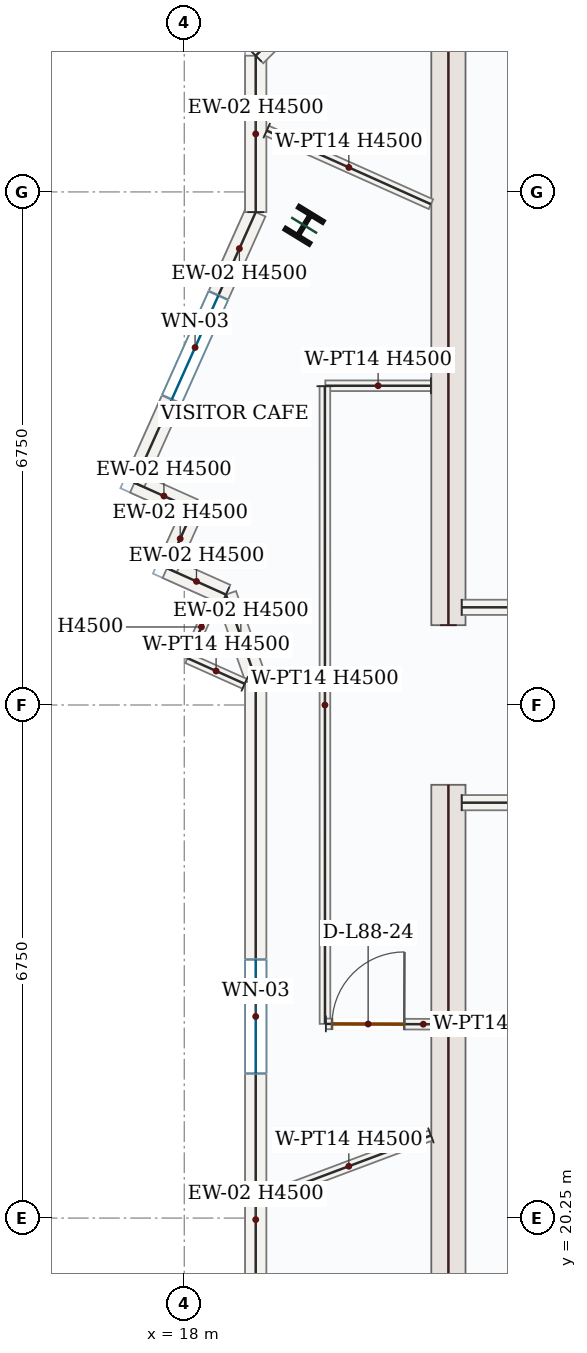
"""IFC4 building model, lengths in metres.
Left out: names, types, materials, properties, quantities, classifications, styles, units other than length and angle.
Written with IfcOpenShell. Run it as: python <this file> out.ifc"""

import sys

from ifc_helpers import new_model, si_unit, direction, frame, frame_2d, origin, origin_2d, place, context, subcontext, project, spatial, rectangle, i_section, extrude, source, transform, mapped, element, fill, save


model = new_model("IFC4")
c1 = context("Model", 3, precision=1e-05, world=origin(), true_north=direction((0.0, 1.0)))
c2 = subcontext(c1, "Body", "Model", "MODEL_VIEW")
j1 = project(units=[si_unit("LENGTHUNIT", "METRE"), si_unit("PLANEANGLEUNIT", "RADIAN")], contexts=[c1])
p1 = place(None, origin())
s1 = spatial("IfcSite", under=j1, at=p1, CompositionType="ELEMENT")
p2 = place(p1, origin())
s2 = spatial("IfcBuilding", under=s1, at=p2, CompositionType="ELEMENT")
p3 = place(p2, frame((0.0, 0.0, 361.05)))
s3 = spatial("IfcBuildingStorey", under=s2, at=p3, CompositionType="ELEMENT", Elevation=361.05)
m1 = source(origin(), c2, "Body", "SweptSolid", [
    extrude(rectangle(XDim=8.55, YDim=0.45, at=frame_2d((4.275, 0.0))), origin(), (0.0, 0.0, 1.0), 4.5),
])
for number, where, z_axis, x_axis in (
    (1, (21.475, 17.4, 0.0), (0.0, 0.0, 1.0), (0.0, 1.0, 0.0)),
    (2, (21.475, 28.05, 0.0), (0.0, 0.0, 1.0), (0.0, 1.0, 0.0)),
):
    element("IfcWall", number, at=place(p3, frame(where, z_axis=z_axis, x_axis=x_axis)), inside=s3, PredefinedType="SHEAR", context=c2, shape_type="MappedRepresentation", body=[
        mapped(m1, transform((0.0, 0.0, 0.0), x_axis=(1.0, 0.0, 0.0), y_axis=(0.0, 1.0, 0.0), z_axis=(0.0, 0.0, 1.0), scale=1.0)),
    ])
m2 = source(origin(), c2, "Body", "SweptSolid", [
    extrude(i_section(OverallWidth=0.369, OverallDepth=0.356, WebThickness=0.011, FlangeThickness=0.018, FilletRadius=0.018, at=origin_2d()), origin(), (0.0, 0.0, 1.0), 4.8),
])
p4 = place(p3, frame((19.577, 33.311, 0.0), z_axis=(0.0, 0.0, 1.0), x_axis=(-0.852640164354, 0.522498564716, 0.0)))
e3 = element("IfcColumn", 3, at=p4, inside=s3, PredefinedType="COLUMN", context=c2, shape_type="MappedRepresentation", body=[
    mapped(m2, transform((0.0, 0.0, 0.0), x_axis=(1.0, 0.0, 0.0), y_axis=(0.0, 1.0, 0.0), z_axis=(0.0, 0.0, 1.0), scale=1.0)),
])
p5 = place(p3, frame((18.94, 18.458, 0.0), z_axis=(0.0, 0.0, 1.0), x_axis=(0.0, 1.0, 0.0)))
e4 = element("IfcWall", 4, at=p5, inside=s3, PredefinedType="SOLIDWALL", context=c2, shape_type="SweptSolid", body=[
    extrude(rectangle(XDim=8.887, YDim=0.28, at=frame_2d((4.444, 0.0))), origin(), (0.0, 0.0, 1.0), 4.5),
])
p6 = place(p5, frame((3.694, 0.0, 0.85)))
e5 = element("IfcOpeningElement", 5, at=p6, cuts=e4, PredefinedType="OPENING", context=c2, shape_type="SweptSolid", body=[
    extrude(rectangle(XDim=1.5, YDim=1.5, at=frame_2d((0.75, 0.75))), frame((0.0, 0.15, 0.0), z_axis=(0.0, -1.0, 0.0), x_axis=(1.0, 0.0, 0.0)), (0.0, 0.0, 1.0), 0.3),
])
m3 = source(origin(), c2, "Body", "SweptSolid", [
    extrude(rectangle(XDim=1.174, YDim=0.28, at=frame_2d((0.587, 0.0))), origin(), (0.0, 0.0, 1.0), 4.5),
])
p7 = place(p3, frame((18.94, 27.345, 0.0), z_axis=(0.0, 0.0, 1.0), x_axis=(-0.333581493928, 0.942721266817, 0.0)))
e6 = element("IfcWall", 6, at=p7, inside=s3, PredefinedType="SOLIDWALL", context=c2, shape_type="MappedRepresentation", body=[
    mapped(m3, transform((0.0, 0.0, 0.0), x_axis=(1.0, 0.0, 0.0), y_axis=(0.0, 1.0, 0.0), z_axis=(0.0, 0.0, 1.0), scale=1.0)),
])
m4 = source(origin(), c2, "Body", "SweptSolid", [
    extrude(rectangle(XDim=0.85, YDim=0.28, at=frame_2d((0.425, 0.0))), origin(), (0.0, 0.0, 1.0), 4.5),
])
p8 = place(p3, frame((18.548, 28.452, 0.0), z_axis=(0.0, 0.0, 1.0), x_axis=(-0.912527808644, 0.409014667771, 0.0)))
e7 = element("IfcWall", 7, at=p8, inside=s3, PredefinedType="SOLIDWALL", context=c2, shape_type="MappedRepresentation", body=[
    mapped(m4, transform((0.0, 0.0, 0.0), x_axis=(1.0, 0.0, 0.0), y_axis=(0.0, 1.0, 0.0), z_axis=(0.0, 0.0, 1.0), scale=1.0)),
])
m5 = source(origin(), c2, "Body", "SweptSolid", [
    extrude(rectangle(XDim=0.85, YDim=0.28, at=frame_2d((0.425, 0.0))), origin(), (0.0, 0.0, 1.0), 4.5),
])
for number, where, z_axis, x_axis in (
    (8, (17.773, 28.8, 0.0), (0.0, 0.0, 1.0), (0.409, 0.913, 0.0)),
    (9, (18.12, 29.575, 0.0), (0.0, 0.0, 1.0), (-0.913, 0.409, 0.0)),
):
    element("IfcWall", number, at=place(p3, frame(where, z_axis=z_axis, x_axis=x_axis)), inside=s3, PredefinedType="SOLIDWALL", context=c2, shape_type="MappedRepresentation", body=[
        mapped(m5, transform((0.0, 0.0, 0.0), x_axis=(1.0, 0.0, 0.0), y_axis=(0.0, 1.0, 0.0), z_axis=(0.0, 0.0, 1.0), scale=1.0)),
    ])
p9 = place(p3, frame((17.344, 29.923, 0.0), z_axis=(0.0, 0.0, 1.0), x_axis=(0.408847516138, 0.912602711232, 0.0)))
e10 = element("IfcWall", 10, at=p9, inside=s3, PredefinedType="SOLIDWALL", context=c2, shape_type="SweptSolid", body=[
    extrude(rectangle(XDim=3.902, YDim=0.28, at=frame_2d((1.951, 0.0))), origin(), (0.0, 0.0, 1.0), 4.5),
])
p10 = place(p9, frame((1.201, 0.0, 0.85)))
e11 = element("IfcOpeningElement", 11, at=p10, cuts=e10, PredefinedType="OPENING", context=c2, shape_type="SweptSolid", body=[
    extrude(rectangle(XDim=1.5, YDim=1.5, at=frame_2d((0.75, 0.75))), frame((0.0, 0.15, 0.0), z_axis=(0.0, -1.0, 0.0), x_axis=(1.0, 0.0, 0.0)), (0.0, 0.0, 1.0), 0.3),
])
m6 = source(origin(), c2, "Body", "SweptSolid", [
    extrude(rectangle(XDim=2.058, YDim=0.28, at=frame_2d((1.029, 0.0))), origin(), (0.0, 0.0, 1.0), 4.5),
])
p11 = place(p3, frame((18.94, 33.484, 0.0), z_axis=(0.0, 0.0, 1.0), x_axis=(0.0, 1.0, 0.0)))
e12 = element("IfcWall", 12, at=p11, inside=s3, PredefinedType="SOLIDWALL", context=c2, shape_type="MappedRepresentation", body=[
    mapped(m6, transform((0.0, 0.0, 0.0), x_axis=(1.0, 0.0, 0.0), y_axis=(0.0, 1.0, 0.0), z_axis=(0.0, 0.0, 1.0), scale=1.0)),
])
m7 = source(origin(), c2, "Body", "SweptSolid", [
    extrude(rectangle(XDim=2.362, YDim=0.28, at=frame_2d((1.181, 0.0))), origin(), (0.0, 0.0, 1.0), 4.5),
])
p12 = place(p3, frame((18.94, 35.542, 0.0), z_axis=(0.0, 0.0, 1.0), x_axis=(0.707106781187, 0.707106781187, 0.0)))
e13 = element("IfcWall", 13, at=p12, inside=s3, PredefinedType="SOLIDWALL", context=c2, shape_type="MappedRepresentation", body=[
    mapped(m7, transform((0.0, 0.0, 0.0), x_axis=(1.0, 0.0, 0.0), y_axis=(0.0, 1.0, 0.0), z_axis=(0.0, 0.0, 1.0), scale=1.0)),
])
m8 = source(origin(), c2, "Body", "SweptSolid", [
    extrude(rectangle(XDim=4.25, YDim=0.2, at=frame_2d((2.125, 0.0))), origin(), (0.0, 0.0, 1.0), 4.5),
])
for number, where, z_axis, x_axis in (
    (14, (21.65, 25.715, 0.0), (0.0, 0.0, 1.0), (1.0, 0.0, 0.0)),
    (15, (21.65, 28.285, 0.0), (0.0, 0.0, 1.0), (1.0, 0.0, 0.0)),
):
    element("IfcWall", number, at=place(p3, frame(where, z_axis=z_axis, x_axis=x_axis)), inside=s3, PredefinedType="SOLIDWALL", context=c2, shape_type="MappedRepresentation", body=[
        mapped(m8, transform((0.0, 0.0, 0.0), x_axis=(1.0, 0.0, 0.0), y_axis=(0.0, 1.0, 0.0), z_axis=(0.0, 0.0, 1.0), scale=1.0)),
    ])
m9 = source(origin(), c2, "Body", "SweptSolid", [
    extrude(rectangle(XDim=2.367, YDim=0.14, at=frame_2d((1.184, 0.0))), origin(), (0.0, 0.0, 1.0), 4.5),
])
p13 = place(p3, frame((19.085, 34.556, 0.0), z_axis=(0.0, 0.0, 1.0), x_axis=(0.912599576991, -0.408854512115, 0.0)))
e16 = element("IfcWall", 16, at=p13, inside=s3, PredefinedType="PARTITIONING", context=c2, shape_type="MappedRepresentation", body=[
    mapped(m9, transform((0.0, 0.0, 0.0), x_axis=(1.0, 0.0, 0.0), y_axis=(0.0, 1.0, 0.0), z_axis=(0.0, 0.0, 1.0), scale=1.0)),
])
m10 = source(origin(), c2, "Body", "SweptSolid", [
    extrude(rectangle(XDim=1.389, YDim=0.14, at=frame_2d((0.695, 0.0))), origin(), (0.0, 0.0, 1.0), 4.5),
])
p14 = place(p3, frame((21.245, 31.2, 0.0), z_axis=(0.0, 0.0, 1.0), x_axis=(-1.0, 0.0, 0.0)))
e17 = element("IfcWall", 17, at=p14, inside=s3, PredefinedType="PARTITIONING", context=c2, shape_type="MappedRepresentation", body=[
    mapped(m10, transform((0.0, 0.0, 0.0), x_axis=(1.0, 0.0, 0.0), y_axis=(0.0, 1.0, 0.0), z_axis=(0.0, 0.0, 1.0), scale=1.0)),
])
m11 = source(origin(), c2, "Body", "SweptSolid", [
    extrude(rectangle(XDim=8.389, YDim=0.14, at=frame_2d((4.195, 0.0))), origin(), (0.0, 0.0, 1.0), 4.5),
])
p15 = place(p3, frame((19.85, 31.194, 0.0), z_axis=(0.0, 0.0, 1.0), x_axis=(0.000145505339, -0.999999989414, 0.0)))
e18 = element("IfcWall", 18, at=p15, inside=s3, PredefinedType="PARTITIONING", context=c2, shape_type="MappedRepresentation", body=[
    mapped(m11, transform((0.0, 0.0, 0.0), x_axis=(1.0, 0.0, 0.0), y_axis=(0.0, 1.0, 0.0), z_axis=(0.0, 0.0, 1.0), scale=1.0)),
])
p16 = place(p3, frame((19.863, 22.805, 0.0), z_axis=(0.0, 0.0, 1.0), x_axis=(0.999994944951, -0.003179634165, 0.0)))
e19 = element("IfcWall", 19, at=p16, inside=s3, PredefinedType="PARTITIONING", context=c2, shape_type="SweptSolid", body=[
    extrude(rectangle(XDim=1.382, YDim=0.14, at=frame_2d((0.691, 0.0))), origin(), (0.0, 0.0, 1.0), 4.5),
])
p17 = place(p16, frame((0.081, 0.0, 0.0)))
e20 = element("IfcOpeningElement", 20, at=p17, cuts=e19, PredefinedType="OPENING", context=c2, shape_type="SweptSolid", body=[
    extrude(rectangle(XDim=0.95, YDim=2.15, at=frame_2d((0.475, 1.075))), frame((0.0, 0.08, 0.0), z_axis=(0.0, -1.0, 0.0), x_axis=(1.0, 0.0, 0.0)), (0.0, 0.0, 1.0), 0.16),
])
m12 = source(origin(), c2, "Body", "SweptSolid", [
    extrude(rectangle(XDim=2.307, YDim=0.14, at=frame_2d((1.154, 0.0))), origin(), (0.0, 0.0, 1.0), 4.5),
])
p18 = place(p3, frame((21.245, 21.337, 0.0), z_axis=(0.0, 0.0, 1.0), x_axis=(-0.936329177569, -0.351123441588, 0.0)))
e21 = element("IfcWall", 21, at=p18, inside=s3, PredefinedType="PARTITIONING", context=c2, shape_type="MappedRepresentation", body=[
    mapped(m12, transform((0.0, 0.0, 0.0), x_axis=(1.0, 0.0, 0.0), y_axis=(0.0, 1.0, 0.0), z_axis=(0.0, 0.0, 1.0), scale=1.0)),
])
m13 = source(origin(), c2, "Body", "SweptSolid", [
    extrude(rectangle(XDim=0.825, YDim=0.14, at=frame_2d((0.413, 0.0))), origin(), (0.0, 0.0, 1.0), 4.5),
])
p19 = place(p3, frame((18.795, 27.279, 0.0), z_axis=(0.0, 0.0, 1.0), x_axis=(-0.912513134147, 0.409047405576, 0.0)))
e22 = element("IfcWall", 22, at=p19, inside=s3, PredefinedType="PARTITIONING", context=c2, shape_type="MappedRepresentation", body=[
    mapped(m13, transform((0.0, 0.0, 0.0), x_axis=(1.0, 0.0, 0.0), y_axis=(0.0, 1.0, 0.0), z_axis=(0.0, 0.0, 1.0), scale=1.0)),
])
m14 = source(origin(), c2, "Body", "SweptSolid", [
    extrude(rectangle(XDim=0.749, YDim=0.14, at=frame_2d((0.375, 0.0))), origin(), (0.0, 0.0, 1.0), 4.5),
])
p20 = place(p3, frame((18.073, 27.685, 0.0), z_axis=(0.0, 0.0, 1.0), x_axis=(0.408737677389, 0.912651911236, 0.0)))
e23 = element("IfcWall", 23, at=p20, inside=s3, PredefinedType="PARTITIONING", context=c2, shape_type="MappedRepresentation", body=[
    mapped(m14, transform((0.0, 0.0, 0.0), x_axis=(1.0, 0.0, 0.0), y_axis=(0.0, 1.0, 0.0), z_axis=(0.0, 0.0, 1.0), scale=1.0)),
])
m15 = source(origin(), c2, "Body", "SweptSolid", [
    extrude(rectangle(XDim=1.5, YDim=1.5, at=frame_2d((0.75, 0.75))), frame((0.0, 0.03, 0.0), z_axis=(0.0, -1.0, 0.0), x_axis=(1.0, 0.0, 0.0)), (0.0, 0.0, 1.0), 0.06),
])
p21 = place(p6, origin())
e24 = element("IfcWindow", 24, at=p21, inside=s3, PartitioningType="SINGLE_PANEL", PredefinedType="WINDOW", context=c2, shape_type="MappedRepresentation", body=[
    mapped(m15, transform((0.0, 0.0, 0.0), x_axis=(1.0, 0.0, 0.0), y_axis=(0.0, 1.0, 0.0), z_axis=(0.0, 0.0, 1.0), scale=1.0)),
])
fill(e5, e24)
p22 = place(p10, origin())
e25 = element("IfcWindow", 25, at=p22, inside=s3, PartitioningType="SINGLE_PANEL", PredefinedType="WINDOW", context=c2, shape_type="MappedRepresentation", body=[
    mapped(m15, transform((0.0, 0.0, 0.0), x_axis=(1.0, 0.0, 0.0), y_axis=(0.0, 1.0, 0.0), z_axis=(0.0, 0.0, 1.0), scale=1.0)),
])
fill(e11, e25)
m16 = source(origin(), c2, "Body", "SweptSolid", [
    extrude(rectangle(XDim=0.95, YDim=2.15, at=frame_2d((0.475, 1.075))), frame((0.0, 0.025, 0.0), z_axis=(0.0, -1.0, 0.0), x_axis=(1.0, 0.0, 0.0)), (0.0, 0.0, 1.0), 0.05),
])
p23 = place(p17, origin())
e26 = element("IfcDoor", 26, at=p23, inside=s3, OperationType="SINGLE_SWING_RIGHT", PredefinedType="DOOR", context=c2, shape_type="MappedRepresentation", body=[
    mapped(m16, transform((0.0, 0.0, 0.0), x_axis=(1.0, 0.0, 0.0), y_axis=(0.0, 1.0, 0.0), z_axis=(0.0, 0.0, 1.0), scale=1.0)),
])
fill(e20, e26)
save(model, sys.argv[1])
